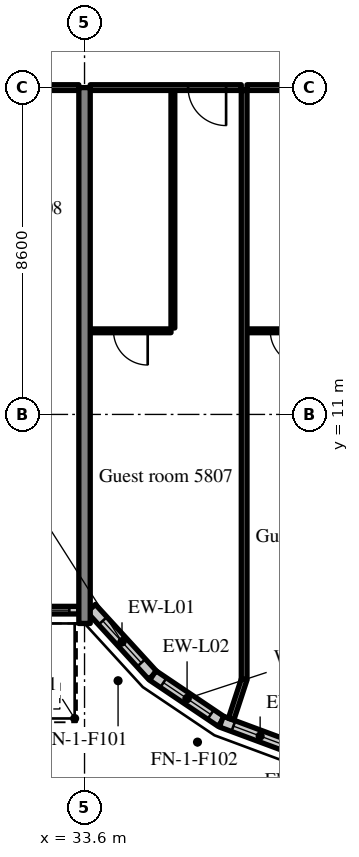
"""IFC4 building model, lengths in metres.
Left out: names, types, materials, properties, quantities, classifications, styles, units other than length and angle.
Written with IfcOpenShell. Run it as: python <this file> out.ifc"""

import sys

from ifc_helpers import new_model, si_unit, direction, frame, frame_2d, origin, place, context, subcontext, project, spatial, rectangle, extrude, source, transform, mapped, element, fill, save


model = new_model("IFC4")
c1 = context("Model", 3, precision=1e-05, world=origin(), true_north=direction((0.0, 1.0)))
c2 = subcontext(c1, "Body", "Model", "MODEL_VIEW")
j1 = project(units=[si_unit("LENGTHUNIT", "METRE"), si_unit("PLANEANGLEUNIT", "RADIAN")], contexts=[c1])
p1 = place(None, origin())
s1 = spatial("IfcSite", under=j1, at=p1, CompositionType="ELEMENT")
p2 = place(p1, origin())
s2 = spatial("IfcBuilding", under=s1, at=p2, CompositionType="ELEMENT")
p3 = place(p2, frame((0.0, 0.0, 241.3)))
s3 = spatial("IfcBuildingStorey", under=s2, at=p3, CompositionType="ELEMENT", Elevation=241.3)
m1 = source(origin(), c2, "Body", "SweptSolid", [
    extrude(rectangle(XDim=14.1, YDim=0.3, at=frame_2d((7.05, 0.0))), origin(), (0.0, 0.0, 1.0), 3.62),
])
p4 = place(p3, frame((33.6, 5.5, 0.0), z_axis=(0.0, 0.0, 1.0), x_axis=(0.0, 1.0, 0.0)))
e1 = element("IfcWall", 1, at=p4, inside=s3, PredefinedType="SHEAR", context=c2, shape_type="MappedRepresentation", body=[
    mapped(m1, transform((0.0, 0.0, 0.0), scale=1.0)),
])
m2 = source(origin(), c2, "Body", "SweptSolid", [
    extrude(rectangle(XDim=8.1, YDim=0.2, at=frame_2d((4.05, 0.0))), origin(), (0.0, 0.0, 1.0), 3.02),
])
p5 = place(p3, frame((25.35, 5.85, 0.0), z_axis=(0.0, 0.0, 1.0), x_axis=(1.0, 0.0, 0.0)))
e2 = element("IfcWall", 2, at=p5, inside=s3, PredefinedType="SOLIDWALL", context=c2, shape_type="MappedRepresentation", body=[
    mapped(m2, transform((0.0, 0.0, 0.0), scale=1.0)),
])
m3 = source(origin(), c2, "Body", "SweptSolid", [
    extrude(rectangle(XDim=1.2, YDim=2.4, at=frame_2d((0.6, 1.2))), frame((0.0, 0.11, 0.0), z_axis=(0.0, -1.0, 0.0), x_axis=(1.0, 0.0, 0.0)), (0.0, 0.0, 1.0), 0.22),
])
p6 = place(p5, frame((0.25, 0.0, 0.0)))
e3 = element("IfcOpeningElement", 3, at=p6, cuts=e2, PredefinedType="OPENING", context=c2, shape_type="MappedRepresentation", body=[
    mapped(m3, transform((0.0, 0.0, 0.0), scale=1.0)),
])
m4 = source(origin(), c2, "Body", "SweptSolid", [
    extrude(rectangle(XDim=1.5, YDim=1.5, at=frame_2d((0.75, 0.75))), frame((0.0, 0.11, 0.0), z_axis=(0.0, -1.0, 0.0), x_axis=(1.0, 0.0, 0.0)), (0.0, 0.0, 1.0), 0.22),
])
p7 = place(p5, frame((2.3, 0.0, 0.9)))
e4 = element("IfcOpeningElement", 4, at=p7, cuts=e2, PredefinedType="OPENING", context=c2, shape_type="MappedRepresentation", body=[
    mapped(m4, transform((0.0, 0.0, 0.0), scale=1.0)),
])
p8 = place(p5, frame((4.3, 0.0, 0.0)))
e5 = element("IfcOpeningElement", 5, at=p8, cuts=e2, PredefinedType="OPENING", context=c2, shape_type="MappedRepresentation", body=[
    mapped(m3, transform((0.0, 0.0, 0.0), scale=1.0)),
])
p9 = place(p5, frame((6.35, 0.0, 0.9)))
e6 = element("IfcOpeningElement", 6, at=p9, cuts=e2, PredefinedType="OPENING", context=c2, shape_type="MappedRepresentation", body=[
    mapped(m4, transform((0.0, 0.0, 0.0), scale=1.0)),
])
m5 = source(origin(), c2, "Body", "SweptSolid", [
    extrude(rectangle(XDim=2.398, YDim=0.3, at=frame_2d((1.199, 0.0))), origin(), (0.0, 0.0, 1.0), 3.62),
])
p10 = place(p3, frame((33.776, 5.9, 0.0), z_axis=(0.0, 0.0, 1.0), x_axis=(0.675374189419, -0.737475222815, 0.0)))
e7 = element("IfcWall", 7, at=p10, inside=s3, PredefinedType="SOLIDWALL", context=c2, shape_type="MappedRepresentation", body=[
    mapped(m5, transform((0.0, 0.0, 0.0), scale=1.0)),
])
m6 = source(origin(), c2, "Body", "SweptSolid", [
    extrude(rectangle(XDim=1.5, YDim=2.0, at=frame_2d((0.75, 1.0))), frame((0.0, 0.16, 0.0), z_axis=(0.0, -1.0, 0.0), x_axis=(1.0, 0.0, 0.0)), (0.0, 0.0, 1.0), 0.32),
])
p11 = place(p10, frame((0.449, 0.0, 0.9)))
e8 = element("IfcOpeningElement", 8, at=p11, cuts=e7, PredefinedType="OPENING", context=c2, shape_type="MappedRepresentation", body=[
    mapped(m6, transform((0.0, 0.0, 0.0), scale=1.0)),
])
m7 = source(origin(), c2, "Body", "SweptSolid", [
    extrude(rectangle(XDim=2.176, YDim=0.3, at=frame_2d((1.088, 0.0))), origin(), (0.0, 0.0, 1.0), 3.62),
])
p12 = place(p3, frame((35.396, 4.131, 0.0), z_axis=(0.0, 0.0, 1.0), x_axis=(0.829590746428, -0.558371913192, 0.0)))
e9 = element("IfcWall", 9, at=p12, inside=s3, PredefinedType="SOLIDWALL", context=c2, shape_type="MappedRepresentation", body=[
    mapped(m7, transform((0.0, 0.0, 0.0), scale=1.0)),
])
p13 = place(p12, frame((0.338, 0.0, 0.9)))
e10 = element("IfcOpeningElement", 10, at=p13, cuts=e9, PredefinedType="OPENING", context=c2, shape_type="MappedRepresentation", body=[
    mapped(m6, transform((0.0, 0.0, 0.0), scale=1.0)),
])
p14 = place(p3, frame((37.201, 2.917, 0.0), z_axis=(0.0, 0.0, 1.0), x_axis=(0.93754555999, -0.347862505801, 0.0)))
e11 = element("IfcWall", 11, at=p14, inside=s3, PredefinedType="SOLIDWALL", context=c2, shape_type="MappedRepresentation", body=[
    mapped(m7, transform((0.0, 0.0, 0.0), scale=1.0)),
])
p15 = place(p14, frame((0.338, 0.0, 0.9)))
e12 = element("IfcOpeningElement", 12, at=p15, cuts=e11, PredefinedType="OPENING", context=c2, shape_type="MappedRepresentation", body=[
    mapped(m6, transform((0.0, 0.0, 0.0), scale=1.0)),
])
m8 = source(origin(), c2, "Body", "SweptSolid", [
    extrude(rectangle(XDim=3.975, YDim=0.15, at=frame_2d((1.987, 0.0))), origin(), (0.0, 0.0, 1.0), 2.92),
])
p16 = place(p3, frame((29.475, 19.6, 0.0), z_axis=(0.0, 0.0, 1.0), x_axis=(1.0, 0.0, 0.0)))
e13 = element("IfcWall", 13, at=p16, inside=s3, PredefinedType="PARTITIONING", context=c2, shape_type="MappedRepresentation", body=[
    mapped(m8, transform((0.0, 0.0, 0.0), scale=1.0)),
])
m9 = source(origin(), c2, "Body", "SweptSolid", [
    extrude(rectangle(XDim=1.0, YDim=2.1, at=frame_2d((0.5, 1.05))), frame((0.0, 0.085, 0.0), z_axis=(0.0, -1.0, 0.0), x_axis=(1.0, 0.0, 0.0)), (0.0, 0.0, 1.0), 0.17),
])
p17 = place(p16, frame((1.487, 0.0, 0.0)))
e14 = element("IfcOpeningElement", 14, at=p17, cuts=e13, PredefinedType="OPENING", context=c2, shape_type="MappedRepresentation", body=[
    mapped(m9, transform((0.0, 0.0, 0.0), scale=1.0)),
])
m10 = source(origin(), c2, "Body", "SweptSolid", [
    extrude(rectangle(XDim=6.25, YDim=0.1, at=frame_2d((3.125, 0.0))), origin(), (0.0, 0.0, 1.0), 3.62),
])
p18 = place(p3, frame((35.925, 13.275, 0.0), z_axis=(0.0, 0.0, 1.0), x_axis=(0.0, 1.0, 0.0)))
e15 = element("IfcWall", 15, at=p18, inside=s3, PredefinedType="PARTITIONING", context=c2, shape_type="MappedRepresentation", body=[
    mapped(m10, transform((0.0, 0.0, 0.0), scale=1.0)),
])
m11 = source(origin(), c2, "Body", "SweptSolid", [
    extrude(rectangle(XDim=2.125, YDim=0.1, at=frame_2d((1.062, 0.0))), origin(), (0.0, 0.0, 1.0), 3.62),
])
p19 = place(p3, frame((33.75, 13.2, 0.0), z_axis=(0.0, 0.0, 1.0), x_axis=(1.0, 0.0, 0.0)))
e16 = element("IfcWall", 16, at=p19, inside=s3, PredefinedType="PARTITIONING", context=c2, shape_type="MappedRepresentation", body=[
    mapped(m11, transform((0.0, 0.0, 0.0), scale=1.0)),
])
m12 = source(origin(), c2, "Body", "SweptSolid", [
    extrude(rectangle(XDim=0.9, YDim=2.1, at=frame_2d((0.45, 1.05))), frame((0.0, 0.06, 0.0), z_axis=(0.0, -1.0, 0.0), x_axis=(1.0, 0.0, 0.0)), (0.0, 0.0, 1.0), 0.12),
])
p20 = place(p19, frame((0.612, 0.0, 0.0)))
e17 = element("IfcOpeningElement", 17, at=p20, cuts=e16, PredefinedType="OPENING", context=c2, shape_type="MappedRepresentation", body=[
    mapped(m12, transform((0.0, 0.0, 0.0), scale=1.0)),
])
m13 = source(origin(), c2, "Body", "SweptSolid", [
    extrude(rectangle(XDim=3.975, YDim=0.15, at=frame_2d((1.988, 0.0))), origin(), (0.0, 0.0, 1.0), 2.92),
])
p21 = place(p3, frame((33.75, 19.6, 0.0), z_axis=(0.0, 0.0, 1.0), x_axis=(1.0, 0.0, 0.0)))
e18 = element("IfcWall", 18, at=p21, inside=s3, PredefinedType="PARTITIONING", context=c2, shape_type="MappedRepresentation", body=[
    mapped(m13, transform((0.0, 0.0, 0.0), scale=1.0)),
])
p22 = place(p21, frame((2.575, 0.0, 0.0)))
e19 = element("IfcOpeningElement", 19, at=p22, cuts=e18, PredefinedType="OPENING", context=c2, shape_type="MappedRepresentation", body=[
    mapped(m9, transform((0.0, 0.0, 0.0), scale=1.0)),
])
p23 = place(p3, frame((37.875, 13.2, 0.0), z_axis=(0.0, 0.0, 1.0), x_axis=(1.0, 0.0, 0.0)))
e20 = element("IfcWall", 20, at=p23, inside=s3, PredefinedType="PARTITIONING", context=c2, shape_type="MappedRepresentation", body=[
    mapped(m11, transform((0.0, 0.0, 0.0), scale=1.0)),
])
p24 = place(p23, frame((0.612, 0.0, 0.0)))
e21 = element("IfcOpeningElement", 21, at=p24, cuts=e20, PredefinedType="OPENING", context=c2, shape_type="MappedRepresentation", body=[
    mapped(m12, transform((0.0, 0.0, 0.0), scale=1.0)),
])
p25 = place(p3, frame((37.875, 19.6, 0.0), z_axis=(0.0, 0.0, 1.0), x_axis=(1.0, 0.0, 0.0)))
e22 = element("IfcWall", 22, at=p25, inside=s3, PredefinedType="PARTITIONING", context=c2, shape_type="MappedRepresentation", body=[
    mapped(m13, transform((0.0, 0.0, 0.0), scale=1.0)),
])
p26 = place(p25, frame((2.575, 0.0, 0.0)))
e23 = element("IfcOpeningElement", 23, at=p26, cuts=e22, PredefinedType="OPENING", context=c2, shape_type="MappedRepresentation", body=[
    mapped(m9, transform((0.0, 0.0, 0.0), scale=1.0)),
])
m14 = source(origin(), c2, "Body", "SweptSolid", [
    extrude(rectangle(XDim=15.498, YDim=0.15, at=frame_2d((7.749, 0.0))), origin(), (0.0, 0.0, 1.0), 3.62),
])
p27 = place(p3, frame((37.8, 4.027, 0.0), z_axis=(0.0, 0.0, 1.0), x_axis=(0.0, 1.0, 0.0)))
e24 = element("IfcWall", 24, at=p27, inside=s3, PredefinedType="PARTITIONING", context=c2, shape_type="MappedRepresentation", body=[
    mapped(m14, transform((0.0, 0.0, 0.0), scale=1.0)),
])
m15 = source(origin(), c2, "Body", "SweptSolid", [
    extrude(rectangle(XDim=1.101, YDim=0.15, at=frame_2d((0.55, 0.0))), origin(), (0.0, 0.0, 1.0), 3.62),
])
p28 = place(p3, frame((37.457, 2.981, 0.0), z_axis=(0.0, 0.0, 1.0), x_axis=(0.311567081539, 0.950224159712, 0.0)))
e25 = element("IfcWall", 25, at=p28, inside=s3, PredefinedType="PARTITIONING", context=c2, shape_type="MappedRepresentation", body=[
    mapped(m15, transform((0.0, 0.0, 0.0), scale=1.0)),
])
m16 = source(origin(), c2, "Body", "SweptSolid", [
    extrude(rectangle(XDim=1.5, YDim=1.5, at=frame_2d((0.75, 0.75))), frame((0.0, 0.03, 0.0), z_axis=(0.0, -1.0, 0.0), x_axis=(1.0, 0.0, 0.0)), (0.0, 0.0, 1.0), 0.06),
])
p29 = place(p9, origin())
e26 = element("IfcWindow", 26, at=p29, inside=s3, PartitioningType="SINGLE_PANEL", PredefinedType="WINDOW", context=c2, shape_type="MappedRepresentation", body=[
    mapped(m16, transform((0.0, 0.0, 0.0), scale=1.0)),
])
fill(e6, e26)
m17 = source(origin(), c2, "Body", "SweptSolid", [
    extrude(rectangle(XDim=1.5, YDim=2.0, at=frame_2d((0.75, 1.0))), frame((0.0, 0.03, 0.0), z_axis=(0.0, -1.0, 0.0), x_axis=(1.0, 0.0, 0.0)), (0.0, 0.0, 1.0), 0.06),
])
p30 = place(p11, origin())
e27 = element("IfcWindow", 27, at=p30, inside=s3, PartitioningType="SINGLE_PANEL", PredefinedType="WINDOW", context=c2, shape_type="MappedRepresentation", body=[
    mapped(m17, transform((0.0, 0.0, 0.0), scale=1.0)),
])
fill(e8, e27)
p31 = place(p13, origin())
e28 = element("IfcWindow", 28, at=p31, inside=s3, PartitioningType="SINGLE_PANEL", PredefinedType="WINDOW", context=c2, shape_type="MappedRepresentation", body=[
    mapped(m17, transform((0.0, 0.0, 0.0), scale=1.0)),
])
fill(e10, e28)
p32 = place(p15, origin())
e29 = element("IfcWindow", 29, at=p32, inside=s3, PartitioningType="SINGLE_PANEL", PredefinedType="WINDOW", context=c2, shape_type="MappedRepresentation", body=[
    mapped(m17, transform((0.0, 0.0, 0.0), scale=1.0)),
])
fill(e12, e29)
m18 = source(origin(), c2, "Body", "SweptSolid", [
    extrude(rectangle(XDim=0.9, YDim=2.1, at=frame_2d((0.45, 1.05))), frame((0.0, 0.025, 0.0), z_axis=(0.0, -1.0, 0.0), x_axis=(1.0, 0.0, 0.0)), (0.0, 0.0, 1.0), 0.05),
])
p33 = place(p20, origin())
e30 = element("IfcDoor", 30, at=p33, inside=s3, OperationType="SINGLE_SWING_RIGHT", PredefinedType="DOOR", context=c2, shape_type="MappedRepresentation", body=[
    mapped(m18, transform((0.0, 0.0, 0.0), scale=1.0)),
])
fill(e17, e30)
m19 = source(origin(), c2, "Body", "SweptSolid", [
    extrude(rectangle(XDim=1.0, YDim=2.1, at=frame_2d((0.5, 1.05))), frame((0.0, 0.025, 0.0), z_axis=(0.0, -1.0, 0.0), x_axis=(1.0, 0.0, 0.0)), (0.0, 0.0, 1.0), 0.05),
])
p34 = place(p22, origin())
e31 = element("IfcDoor", 31, at=p34, inside=s3, OperationType="SINGLE_SWING_RIGHT", PredefinedType="DOOR", context=c2, shape_type="MappedRepresentation", body=[
    mapped(m19, transform((0.0, 0.0, 0.0), scale=1.0)),
])
fill(e19, e31)
p35 = place(p24, origin())
e32 = element("IfcDoor", 32, at=p35, inside=s3, OperationType="SINGLE_SWING_RIGHT", PredefinedType="DOOR", context=c2, shape_type="MappedRepresentation", body=[
    mapped(m18, transform((0.0, 0.0, 0.0), scale=1.0)),
])
fill(e21, e32)
save(model, sys.argv[1])
